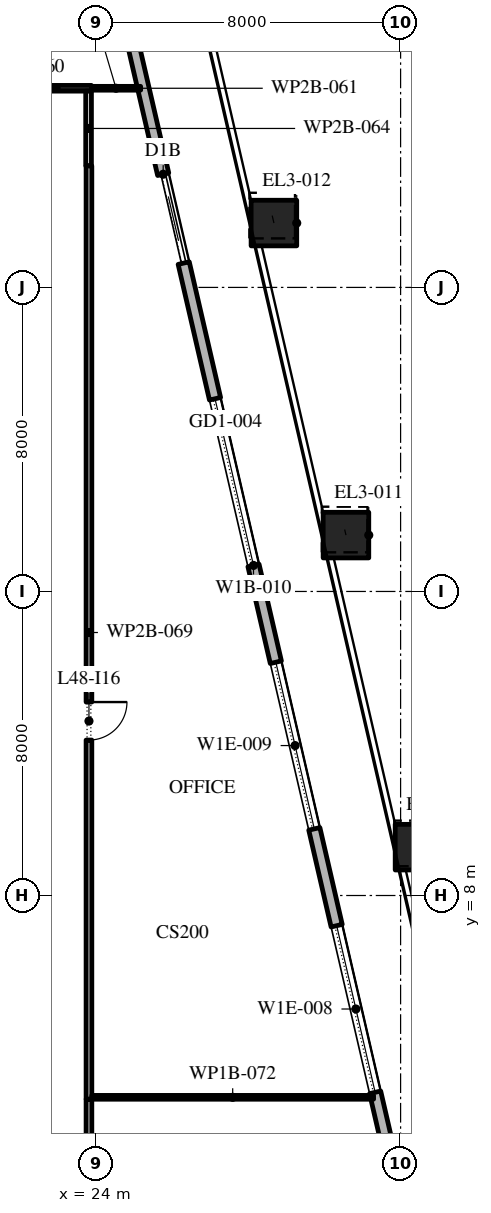
"""IFC4 building model, lengths in metres.
Left out: names, types, materials, properties, quantities, classifications, styles, units other than length and angle.
Written with IfcOpenShell. Run it as: python <this file> out.ifc"""

import sys

from ifc_helpers import new_model, si_unit, direction, frame, frame_2d, origin, origin_2d, place, context, subcontext, project, spatial, rectangle, extrude, element, fill, save


model = new_model("IFC4")
c1 = context("Model", 3, precision=1e-05, world=origin(), true_north=direction((0.0, 1.0)))
c2 = subcontext(c1, "Body", "Model", "MODEL_VIEW")
j1 = project(units=[si_unit("LENGTHUNIT", "METRE"), si_unit("PLANEANGLEUNIT", "RADIAN")], contexts=[c1])
p1 = place(None, origin())
s1 = spatial("IfcSite", under=j1, at=p1, CompositionType="ELEMENT")
p2 = place(p1, origin())
s2 = spatial("IfcBuilding", under=s1, at=p2, CompositionType="ELEMENT")
p3 = place(p2, frame((0.0, 0.0, 217.8)))
s3 = spatial("IfcBuildingStorey", under=s2, at=p3, CompositionType="ELEMENT", Elevation=217.8)
p4 = place(p3, frame((32.458, 9.272, 0.0), z_axis=(-0.005404472139, 0.023419379268, 0.999711120452), x_axis=(-0.974391195695, -0.224859506699, 0.0)))
e1 = element("IfcColumn", 1, at=p4, inside=s3, PredefinedType="COLUMN", context=c2, shape_type="SweptSolid", body=[
    extrude(rectangle(XDim=1.2, YDim=1.2, at=origin_2d()), origin(), (0.0, 0.0, 1.0), 4.201),
])
p5 = place(p3, frame((30.562, 17.483, 0.0), z_axis=(-0.008132835078, 0.035087374195, 0.999351156084), x_axis=(-0.97417327444, -0.225801752354, 0.0)))
e2 = element("IfcColumn", 2, at=p5, inside=s3, PredefinedType="COLUMN", context=c2, shape_type="SweptSolid", body=[
    extrude(rectangle(XDim=1.2, YDim=1.2, at=origin_2d()), origin(), (0.0, 0.0, 1.0), 4.203),
])
p6 = place(p3, frame((28.667, 25.693, 0.0), z_axis=(-0.010799619665, 0.046740289408, 0.998848694028), x_axis=(-0.974329962248, -0.225124686929, 0.0)))
e3 = element("IfcColumn", 3, at=p6, inside=s3, PredefinedType="COLUMN", context=c2, shape_type="SweptSolid", body=[
    extrude(rectangle(XDim=1.2, YDim=1.2, at=origin_2d()), origin(), (0.0, 0.0, 1.0), 4.205),
])
p7 = place(p3, frame((33.157, -5.092, 0.0), z_axis=(0.0, 0.0, 1.0), x_axis=(-0.22494993302, 0.974370323663, 0.0)))
e4 = element("IfcWall", 4, at=p7, inside=s3, PredefinedType="STANDARD", context=c2, shape_type="SweptSolid", body=[
    extrude(rectangle(XDim=36.478, YDim=0.3, at=frame_2d((18.239, 0.0))), origin(), (0.0, 0.0, 1.0), 3.95),
])
p8 = place(p7, frame((2.207, 0.0, 0.0)))
e5 = element("IfcOpeningElement", 5, at=p8, cuts=e4, PredefinedType="OPENING", context=c2, shape_type="SweptSolid", body=[
    extrude(rectangle(XDim=2.4, YDim=3.075, at=frame_2d((1.2, 1.538))), frame((0.0, 0.16, 0.0), z_axis=(0.0, -1.0, 0.0), x_axis=(1.0, 0.0, 0.0)), (0.0, 0.0, 1.0), 0.32),
])
p9 = place(p7, frame((8.121, 0.0, 0.45)))
e6 = element("IfcOpeningElement", 6, at=p9, cuts=e4, PredefinedType="OPENING", context=c2, shape_type="SweptSolid", body=[
    extrude(rectangle(XDim=4.5, YDim=2.825, at=frame_2d((2.25, 1.413))), frame((0.0, 0.16, 0.0), z_axis=(0.0, -1.0, 0.0), x_axis=(1.0, 0.0, 0.0)), (0.0, 0.0, 1.0), 0.32),
])
p10 = place(p7, frame((15.236, 0.0, 0.45)))
e7 = element("IfcOpeningElement", 7, at=p10, cuts=e4, PredefinedType="OPENING", context=c2, shape_type="SweptSolid", body=[
    extrude(rectangle(XDim=4.5, YDim=2.825, at=frame_2d((2.25, 1.413))), frame((0.0, 0.16, 0.0), z_axis=(0.0, -1.0, 0.0), x_axis=(1.0, 0.0, 0.0)), (0.0, 0.0, 1.0), 0.32),
])
p11 = place(p7, frame((22.35, 0.0, 0.45)))
e8 = element("IfcOpeningElement", 8, at=p11, cuts=e4, PredefinedType="OPENING", context=c2, shape_type="SweptSolid", body=[
    extrude(rectangle(XDim=4.5, YDim=2.95, at=frame_2d((2.25, 1.475))), frame((0.0, 0.16, 0.0), z_axis=(0.0, -1.0, 0.0), x_axis=(1.0, 0.0, 0.0)), (0.0, 0.0, 1.0), 0.32),
])
p12 = place(p7, frame((30.514, 0.0, 0.0)))
e9 = element("IfcOpeningElement", 9, at=p12, cuts=e4, PredefinedType="OPENING", context=c2, shape_type="SweptSolid", body=[
    extrude(rectangle(XDim=2.4, YDim=3.4, at=frame_2d((1.2, 1.7))), frame((0.0, 0.16, 0.0), z_axis=(0.0, -1.0, 0.0), x_axis=(1.0, 0.0, 0.0)), (0.0, 0.0, 1.0), 0.32),
])
p13 = place(p3, frame((22.01, 29.24, 0.0), z_axis=(0.0, 0.0, 1.0), x_axis=(1.0, 0.0, 0.0)))
e10 = element("IfcWall", 10, at=p13, inside=s3, PredefinedType="PARTITIONING", context=c2, shape_type="SweptSolid", body=[
    extrude(rectangle(XDim=1.855, YDim=0.15, at=frame_2d((0.927, 0.0))), origin(), (0.0, 0.0, 1.0), 3.95),
])
p14 = place(p3, frame((23.79, 29.165, 0.0), z_axis=(0.0, 0.0, 1.0), x_axis=(0.0, -1.0, 0.0)))
e11 = element("IfcWall", 11, at=p14, inside=s3, PredefinedType="PARTITIONING", context=c2, shape_type="SweptSolid", body=[
    extrude(rectangle(XDim=1.965, YDim=0.15, at=frame_2d((0.982, 0.0))), origin(), (0.0, 0.0, 1.0), 3.95),
])
p15 = place(p3, frame((23.865, 29.24, 0.0), z_axis=(0.0, 0.0, 1.0), x_axis=(1.0, 0.0, 0.0)))
e12 = element("IfcWall", 12, at=p15, inside=s3, PredefinedType="PARTITIONING", context=c2, shape_type="SweptSolid", body=[
    extrude(rectangle(XDim=1.295, YDim=0.1, at=frame_2d((0.647, 0.0))), origin(), (0.0, 0.0, 1.0), 3.95),
])
p16 = place(p3, frame((23.8, 2.64, 0.0), z_axis=(0.0, 0.0, 1.0), x_axis=(0.0, -1.0, 0.0)))
e13 = element("IfcWall", 13, at=p16, inside=s3, PredefinedType="PARTITIONING", context=c2, shape_type="SweptSolid", body=[
    extrude(rectangle(XDim=6.93, YDim=0.15, at=frame_2d((3.465, 0.0))), origin(), (0.0, 0.0, 1.0), 3.95),
])
p17 = place(p16, frame((2.98, 0.0, 0.0)))
e14 = element("IfcOpeningElement", 14, at=p17, cuts=e13, PredefinedType="OPENING", context=c2, shape_type="SweptSolid", body=[
    extrude(rectangle(XDim=1.0, YDim=2.1, at=frame_2d((0.5, 1.05))), frame((0.0, 0.085, 0.0), z_axis=(0.0, -1.0, 0.0), x_axis=(1.0, 0.0, 0.0)), (0.0, 0.0, 1.0), 0.17),
])
p18 = place(p3, frame((23.8, 27.2, 0.0), z_axis=(0.0, 0.0, 1.0), x_axis=(0.0, -1.0, 0.0)))
e15 = element("IfcWall", 15, at=p18, inside=s3, PredefinedType="PARTITIONING", context=c2, shape_type="SweptSolid", body=[
    extrude(rectangle(XDim=24.56, YDim=0.15, at=frame_2d((12.28, 0.0))), origin(), (0.0, 0.0, 1.0), 3.95),
])
p19 = place(p18, frame((14.11, 0.0, 0.0)))
e16 = element("IfcOpeningElement", 16, at=p19, cuts=e15, PredefinedType="OPENING", context=c2, shape_type="SweptSolid", body=[
    extrude(rectangle(XDim=1.0, YDim=2.1, at=frame_2d((0.5, 1.05))), frame((0.0, 0.085, 0.0), z_axis=(0.0, -1.0, 0.0), x_axis=(1.0, 0.0, 0.0)), (0.0, 0.0, 1.0), 0.17),
])
p20 = place(p3, frame((31.289, 2.69, 0.0), z_axis=(0.0, 0.0, 1.0), x_axis=(-1.0, 0.0, 0.0)))
e17 = element("IfcWall", 17, at=p20, inside=s3, PredefinedType="PARTITIONING", context=c2, shape_type="SweptSolid", body=[
    extrude(rectangle(XDim=7.414, YDim=0.1, at=frame_2d((3.707, 0.0))), origin(), (0.0, 0.0, 1.0), 3.95),
])
p21 = place(p9, origin())
e18 = element("IfcWindow", 18, at=p21, inside=s3, PartitioningType="DOUBLE_PANEL_VERTICAL", PredefinedType="WINDOW", context=c2, shape_type="SweptSolid", body=[
    extrude(rectangle(XDim=4.5, YDim=2.825, at=frame_2d((2.25, 1.413))), frame((0.0, 0.03, 0.0), z_axis=(0.0, -1.0, 0.0), x_axis=(1.0, 0.0, 0.0)), (0.0, 0.0, 1.0), 0.06),
])
fill(e6, e18)
p22 = place(p10, origin())
e19 = element("IfcWindow", 19, at=p22, inside=s3, PartitioningType="DOUBLE_PANEL_VERTICAL", PredefinedType="WINDOW", context=c2, shape_type="SweptSolid", body=[
    extrude(rectangle(XDim=4.5, YDim=2.825, at=frame_2d((2.25, 1.413))), frame((0.0, 0.03, 0.0), z_axis=(0.0, -1.0, 0.0), x_axis=(1.0, 0.0, 0.0)), (0.0, 0.0, 1.0), 0.06),
])
fill(e7, e19)
p23 = place(p11, origin())
e20 = element("IfcWindow", 20, at=p23, inside=s3, PartitioningType="DOUBLE_PANEL_VERTICAL", PredefinedType="WINDOW", context=c2, shape_type="SweptSolid", body=[
    extrude(rectangle(XDim=4.5, YDim=2.95, at=frame_2d((2.25, 1.475))), frame((0.0, 0.03, 0.0), z_axis=(0.0, -1.0, 0.0), x_axis=(1.0, 0.0, 0.0)), (0.0, 0.0, 1.0), 0.06),
])
fill(e8, e20)
p24 = place(p12, origin())
e21 = element("IfcDoor", 21, at=p24, inside=s3, OperationType="DOUBLE_DOOR_SLIDING", PredefinedType="DOOR", context=c2, shape_type="SweptSolid", body=[
    extrude(rectangle(XDim=2.4, YDim=3.4, at=frame_2d((1.2, 1.7))), frame((0.0, 0.025, 0.0), z_axis=(0.0, -1.0, 0.0), x_axis=(1.0, 0.0, 0.0)), (0.0, 0.0, 1.0), 0.05),
])
fill(e9, e21)
p25 = place(p19, origin())
e22 = element("IfcDoor", 22, at=p25, inside=s3, OperationType="SINGLE_SWING_RIGHT", PredefinedType="DOOR", context=c2, shape_type="SweptSolid", body=[
    extrude(rectangle(XDim=1.0, YDim=2.1, at=frame_2d((0.5, 1.05))), frame((0.0, 0.025, 0.0), z_axis=(0.0, -1.0, 0.0), x_axis=(1.0, 0.0, 0.0)), (0.0, 0.0, 1.0), 0.05),
])
fill(e16, e22)
save(model, sys.argv[1])
